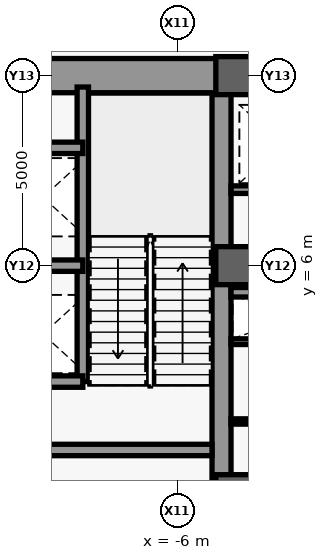
"""IFC4 building model, lengths in metres.
Left out: names, types, materials, properties, quantities, classifications, styles, units other than length and angle.
Written with IfcOpenShell. Run it as: python <this file> out.ifc"""

import sys

from ifc_helpers import new_model, si_unit, direction, frame, frame_2d, origin, origin_2d, place, context, subcontext, project, spatial, rectangle, extrude, source, transform, mapped, element, save


model = new_model("IFC4")
c1 = context("Model", 3, precision=1e-05, world=origin(), true_north=direction((0.0, 1.0)))
c2 = subcontext(c1, "Body", "Model", "MODEL_VIEW")
j1 = project(units=[si_unit("LENGTHUNIT", "METRE"), si_unit("PLANEANGLEUNIT", "RADIAN")], contexts=[c1])
p1 = place(None, origin())
s1 = spatial("IfcSite", under=j1, at=p1, CompositionType="ELEMENT")
p2 = place(p1, origin())
s2 = spatial("IfcBuilding", under=s1, at=p2, CompositionType="ELEMENT")
p3 = place(p2, frame((0.0, 0.0, 6.6)))
s3 = spatial("IfcBuildingStorey", under=s2, at=p3, CompositionType="ELEMENT", Elevation=6.6)
m1 = source(origin(), c2, "Body", "SweptSolid", [
    extrude(rectangle(XDim=21.4, YDim=0.5, at=frame_2d((10.7, 0.0))), origin(), (0.0, 0.0, 1.0), 5.08),
])
p4 = place(p3, frame((-4.85, -10.7, 0.0), z_axis=(0.0, 0.0, 1.0), x_axis=(0.0, 1.0, 0.0)))
e1 = element("IfcWall", 1, at=p4, inside=s3, PredefinedType="SHEAR", context=c2, shape_type="MappedRepresentation", body=[
    mapped(m1, transform((0.0, 0.0, 0.0), scale=1.0)),
])
m2 = source(origin(), c2, "Body", "SweptSolid", [
    extrude(rectangle(XDim=5.85, YDim=0.9, at=frame_2d((2.925, 0.0))), origin(), (0.0, 0.0, 1.0), 5.08),
])
p5 = place(p3, frame((-10.7, 11.0, 0.0), z_axis=(0.0, 0.0, 1.0), x_axis=(1.0, 0.0, 0.0)))
e2 = element("IfcWall", 2, at=p5, inside=s3, PredefinedType="SHEAR", context=c2, shape_type="MappedRepresentation", body=[
    mapped(m2, transform((0.0, 0.0, 0.0), scale=1.0)),
])
m3 = source(origin(), c2, "Body", "SweptSolid", [
    extrude(rectangle(XDim=5.6, YDim=0.3, at=frame_2d((2.8, 0.0))), origin(), (0.0, 0.0, 1.0), 5.08),
])
p6 = place(p3, frame((-10.7, 1.15, 0.0), z_axis=(0.0, 0.0, 1.0), x_axis=(1.0, 0.0, 0.0)))
e3 = element("IfcWall", 3, at=p6, inside=s3, PredefinedType="SHEAR", context=c2, shape_type="MappedRepresentation", body=[
    mapped(m3, transform((0.0, 0.0, 0.0), scale=1.0)),
])
m4 = source(origin(), c2, "Body", "SweptSolid", [
    extrude(rectangle(XDim=9.2, YDim=0.5, at=frame_2d((4.6, 0.0))), origin(), (0.0, 0.0, 1.0), 5.08),
])
p7 = place(p3, frame((-4.6, 11.0, 0.0), z_axis=(0.0, 0.0, 1.0), x_axis=(1.0, 0.0, 0.0)))
e4 = element("IfcWall", 4, at=p7, inside=s3, PredefinedType="SHEAR", context=c2, shape_type="MappedRepresentation", body=[
    mapped(m4, transform((0.0, 0.0, 0.0), scale=1.0)),
])
m5 = source(origin(), c2, "Body", "SweptSolid", [
    extrude(rectangle(XDim=1.8, YDim=2.25, at=frame_2d((0.9, 1.125))), frame((0.0, 0.26, 0.0), z_axis=(0.0, -1.0, 0.0), x_axis=(1.0, 0.0, 0.0)), (0.0, 0.0, 1.0), 0.52),
])
p8 = place(p7, frame((3.7, 0.0, 0.0)))
e5 = element("IfcOpeningElement", 5, at=p8, cuts=e4, PredefinedType="OPENING", context=c2, shape_type="MappedRepresentation", body=[
    mapped(m5, transform((0.0, 0.0, 0.0), scale=1.0)),
])
m6 = source(origin(), c2, "Body", "SweptSolid", [
    extrude(rectangle(XDim=1.0, YDim=1.0, at=origin_2d()), origin(), (0.0, 0.0, 1.0), 5.4),
])
for number, where, z_axis, x_axis in (
    (6, (-4.5, 0.0, 0.0), (0.0, 0.0, 1.0), (1.0, 0.0, 0.0)),
    (7, (-4.5, 6.0, 0.0), (0.0, 0.0, 1.0), (1.0, 0.0, 0.0)),
    (8, (-4.5, 11.0, 0.0), (0.0, 0.0, 1.0), (1.0, 0.0, 0.0)),
):
    element("IfcColumn", number, at=place(p3, frame(where, z_axis=z_axis, x_axis=x_axis)), inside=s3, PredefinedType="COLUMN", context=c2, shape_type="MappedRepresentation", body=[
        mapped(m6, transform((0.0, 0.0, 0.0), scale=1.0)),
    ])
m7 = source(origin(), c2, "Body", "SweptSolid", [
    extrude(rectangle(XDim=7.75, YDim=0.3, at=frame_2d((3.875, 0.0))), origin(), (0.0, 0.0, 1.0), 5.08),
])
p9 = place(p3, frame((-8.5, 2.95, 0.0), z_axis=(0.0, 0.0, 1.0), x_axis=(0.0, 1.0, 0.0)))
e9 = element("IfcWall", 9, at=p9, inside=s3, PredefinedType="SHEAR", context=c2, shape_type="MappedRepresentation", body=[
    mapped(m7, transform((0.0, 0.0, 0.0), scale=1.0)),
])
m8 = source(origin(), c2, "Body", "SweptSolid", [
    extrude(rectangle(XDim=2.2, YDim=0.3, at=frame_2d((1.1, 0.0))), origin(), (0.0, 0.0, 1.0), 5.08),
])
for number, where, z_axis, x_axis in (
    (10, (-10.7, 2.95, 0.0), (0.0, 0.0, 1.0), (1.0, 0.0, 0.0)),
    (11, (-10.7, 6.0, 0.0), (0.0, 0.0, 1.0), (1.0, 0.0, 0.0)),
    (12, (-10.7, 9.1, 0.0), (0.0, 0.0, 1.0), (1.0, 0.0, 0.0)),
):
    element("IfcWall", number, at=place(p3, frame(where, z_axis=z_axis, x_axis=x_axis)), inside=s3, PredefinedType="SHEAR", context=c2, shape_type="MappedRepresentation", body=[
        mapped(m8, transform((0.0, 0.0, 0.0), scale=1.0)),
    ])
m9 = source(origin(), c2, "Body", "SweptSolid", [
    extrude(rectangle(XDim=3.45, YDim=0.15, at=frame_2d((1.725, 0.0))), origin(), (0.0, 0.0, 1.0), 5.08),
])
p10 = place(p3, frame((-4.6, 4.0, 0.0), z_axis=(0.0, 0.0, 1.0), x_axis=(1.0, 0.0, 0.0)))
e13 = element("IfcWall", 13, at=p10, inside=s3, PredefinedType="PARTITIONING", context=c2, shape_type="MappedRepresentation", body=[
    mapped(m9, transform((0.0, 0.0, 0.0), scale=1.0)),
])
m10 = source(origin(), c2, "Body", "SweptSolid", [
    extrude(rectangle(XDim=2.45, YDim=0.2, at=frame_2d((1.225, 0.0))), origin(), (0.0, 0.0, 1.0), 5.08),
])
p11 = place(p3, frame((-4.6, 8.0, 0.0), z_axis=(0.0, 0.0, 1.0), x_axis=(1.0, 0.0, 0.0)))
e14 = element("IfcWall", 14, at=p11, inside=s3, PredefinedType="SHEAR", context=c2, shape_type="MappedRepresentation", body=[
    mapped(m10, transform((0.0, 0.0, 0.0), scale=1.0)),
])
m11 = source(origin(), c2, "Body", "SweptSolid", [
    extrude(rectangle(XDim=9.2, YDim=0.25, at=frame_2d((4.6, 0.0))), origin(), (0.0, 0.0, 1.0), 5.08),
])
p12 = place(p3, frame((-4.6, 5.3, 0.0), z_axis=(0.0, 0.0, 1.0), x_axis=(1.0, 0.0, 0.0)))
e15 = element("IfcWall", 15, at=p12, inside=s3, PredefinedType="SHEAR", context=c2, shape_type="MappedRepresentation", body=[
    mapped(m11, transform((0.0, 0.0, 0.0), scale=1.0)),
])
m12 = source(origin(), c2, "Body", "SweptSolid", [
    extrude(rectangle(XDim=1.05, YDim=2.2, at=frame_2d((0.525, 1.1))), frame((0.0, 0.135, 0.0), z_axis=(0.0, -1.0, 0.0), x_axis=(1.0, 0.0, 0.0)), (0.0, 0.0, 1.0), 0.27),
])
p13 = place(p12, frame((4.075, 0.0, 0.0)))
e16 = element("IfcOpeningElement", 16, at=p13, cuts=e15, PredefinedType="OPENING", context=c2, shape_type="MappedRepresentation", body=[
    mapped(m12, transform((0.0, 0.0, 0.0), scale=1.0)),
])
m13 = source(origin(), c2, "Body", "SweptSolid", [
    extrude(rectangle(XDim=3.45, YDim=0.14, at=frame_2d((1.725, 0.0))), origin(), (0.0, 0.0, 1.0), 5.08),
])
p14 = place(p3, frame((-4.6, 1.9, 0.0), z_axis=(0.0, 0.0, 1.0), x_axis=(1.0, 0.0, 0.0)))
e17 = element("IfcWall", 17, at=p14, inside=s3, PredefinedType="PARTITIONING", context=c2, shape_type="MappedRepresentation", body=[
    mapped(m13, transform((0.0, 0.0, 0.0), scale=1.0)),
])
save(model, sys.argv[1])
